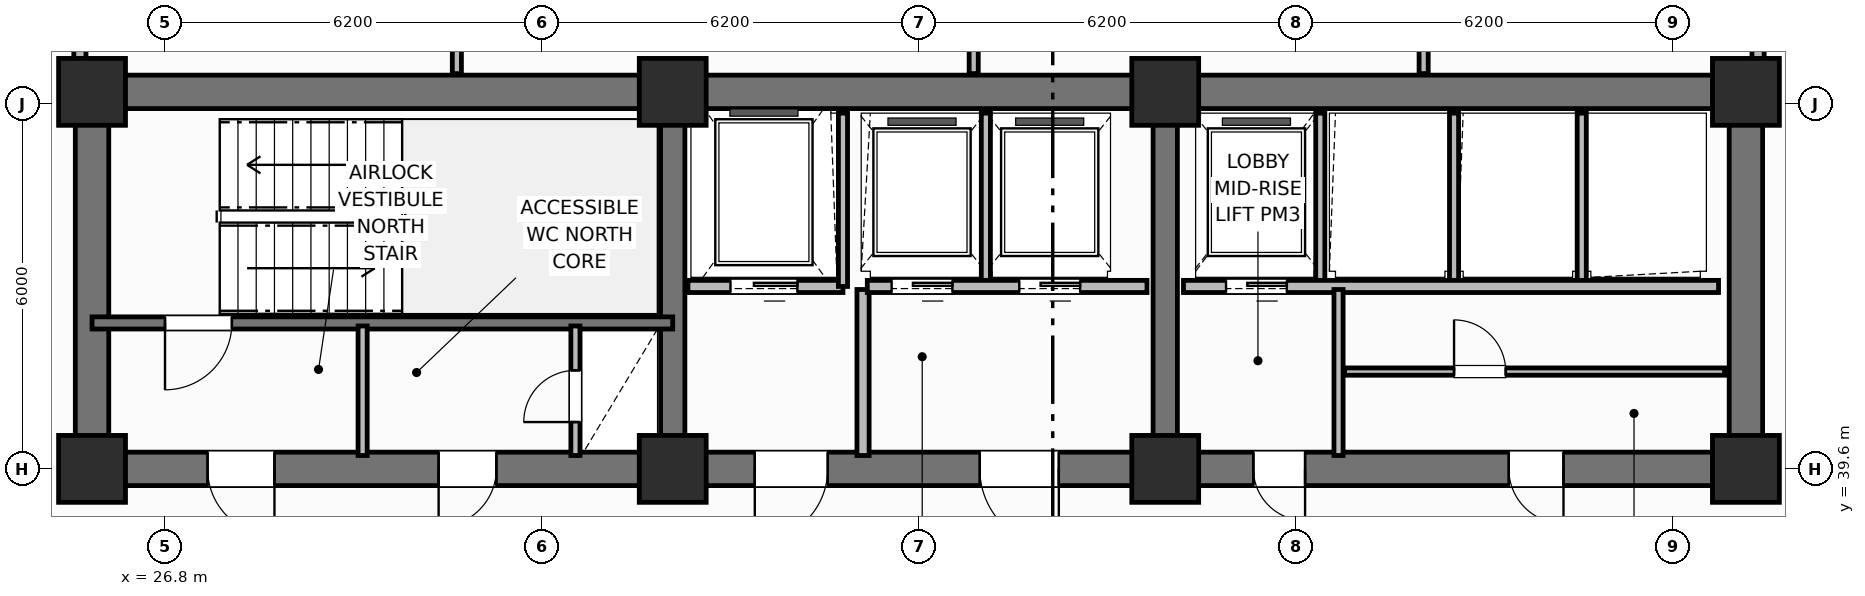
"""IFC4 building model, lengths in metres.
Left out: names, types, materials, properties, quantities, classifications, styles, units other than length and angle.
Written with IfcOpenShell. Run it as: python <this file> out.ifc"""

import sys

from ifc_helpers import new_model, si_unit, direction, frame, frame_2d, origin, origin_2d, place, context, subcontext, project, spatial, rectangle, extrude, element, fill, save


model = new_model("IFC4")
c1 = context("Model", 3, precision=1e-05, world=origin(), true_north=direction((0.0, 1.0)))
c2 = subcontext(c1, "Body", "Model", "MODEL_VIEW")
j1 = project(units=[si_unit("LENGTHUNIT", "METRE"), si_unit("PLANEANGLEUNIT", "RADIAN")], contexts=[c1])
p1 = place(None, origin())
s1 = spatial("IfcSite", under=j1, at=p1, CompositionType="ELEMENT")
p2 = place(p1, origin())
s2 = spatial("IfcBuilding", under=s1, at=p2, CompositionType="ELEMENT")
p3 = place(p2, frame((0.0, 0.0, 110.5)))
s3 = spatial("IfcBuildingStorey", under=s2, at=p3, CompositionType="ELEMENT", Elevation=110.5)
p4 = place(p3, frame((25.6, 45.8, 0.0), z_axis=(0.0, 0.0, 1.0), x_axis=(1.0, 0.0, 0.0)))
e1 = element("IfcWall", 1, at=p4, inside=s3, PredefinedType="SHEAR", context=c2, shape_type="SweptSolid", body=[
    extrude(rectangle(XDim=27.2, YDim=0.55, at=frame_2d((13.6, 0.0))), origin(), (0.0, 0.0, 1.0), 3.7),
])
for number, where, z_axis, x_axis in (
    (2, (25.6, 39.875, 0.0), (0.0, 0.0, 1.0), (0.0, 1.0, 0.0)),
    (3, (52.8, 39.875, 0.0), (0.0, 0.0, 1.0), (0.0, 1.0, 0.0)),
):
    element("IfcWall", number, at=place(p3, frame(where, z_axis=z_axis, x_axis=x_axis)), inside=s3, PredefinedType="SHEAR", context=c2, shape_type="SweptSolid", body=[
        extrude(rectangle(XDim=5.65, YDim=0.55, at=frame_2d((2.825, 0.0))), origin(), (0.0, 0.0, 1.0), 3.7),
    ])
p5 = place(p3, frame((52.8, 39.6, 0.0), z_axis=(0.0, 0.0, 1.0), x_axis=(-1.0, 0.0, 0.0)))
e4 = element("IfcWall", 4, at=p5, inside=s3, PredefinedType="SHEAR", context=c2, shape_type="SweptSolid", body=[
    extrude(rectangle(XDim=27.2, YDim=0.55, at=frame_2d((13.6, 0.0))), origin(), (0.0, 0.0, 1.0), 3.7),
])
p6 = place(p5, frame((24.2, 0.0, 0.0)))
e5 = element("IfcOpeningElement", 5, at=p6, cuts=e4, PredefinedType="OPENING", context=c2, shape_type="SweptSolid", body=[
    extrude(rectangle(XDim=1.1, YDim=2.15, at=frame_2d((0.55, 1.075))), frame((0.0, 0.285, 0.0), z_axis=(0.0, -1.0, 0.0), x_axis=(1.0, 0.0, 0.0)), (0.0, 0.0, 1.0), 0.57),
])
p7 = place(p5, frame((20.55, 0.0, 0.0)))
e6 = element("IfcOpeningElement", 6, at=p7, cuts=e4, PredefinedType="OPENING", context=c2, shape_type="SweptSolid", body=[
    extrude(rectangle(XDim=0.95, YDim=2.1, at=frame_2d((0.475, 1.05))), frame((0.0, 0.285, 0.0), z_axis=(0.0, -1.0, 0.0), x_axis=(1.0, 0.0, 0.0)), (0.0, 0.0, 1.0), 0.57),
])
p8 = place(p5, frame((15.1, 0.0, 0.0)))
e7 = element("IfcOpeningElement", 7, at=p8, cuts=e4, PredefinedType="OPENING", context=c2, shape_type="SweptSolid", body=[
    extrude(rectangle(XDim=1.2, YDim=2.15, at=frame_2d((0.6, 1.075))), frame((0.0, 0.285, 0.0), z_axis=(0.0, -1.0, 0.0), x_axis=(1.0, 0.0, 0.0)), (0.0, 0.0, 1.0), 0.57),
])
p9 = place(p5, frame((11.3, 0.0, 0.0)))
e8 = element("IfcOpeningElement", 8, at=p9, cuts=e4, PredefinedType="OPENING", context=c2, shape_type="SweptSolid", body=[
    extrude(rectangle(XDim=1.3, YDim=2.2, at=frame_2d((0.65, 1.1))), frame((0.0, 0.285, 0.0), z_axis=(0.0, -1.0, 0.0), x_axis=(1.0, 0.0, 0.0)), (0.0, 0.0, 1.0), 0.57),
])
p10 = place(p5, frame((7.25, 0.0, 0.0)))
e9 = element("IfcOpeningElement", 9, at=p10, cuts=e4, PredefinedType="OPENING", context=c2, shape_type="SweptSolid", body=[
    extrude(rectangle(XDim=0.85, YDim=2.1, at=frame_2d((0.425, 1.05))), frame((0.0, 0.285, 0.0), z_axis=(0.0, -1.0, 0.0), x_axis=(1.0, 0.0, 0.0)), (0.0, 0.0, 1.0), 0.57),
])
p11 = place(p5, frame((3.0, 0.0, 0.0)))
e10 = element("IfcOpeningElement", 10, at=p11, cuts=e4, PredefinedType="OPENING", context=c2, shape_type="SweptSolid", body=[
    extrude(rectangle(XDim=0.9, YDim=2.1, at=frame_2d((0.45, 1.05))), frame((0.0, 0.285, 0.0), z_axis=(0.0, -1.0, 0.0), x_axis=(1.0, 0.0, 0.0)), (0.0, 0.0, 1.0), 0.57),
])
for number, where, z_axis, x_axis in (
    (11, (35.15, 39.875, 0.0), (0.0, 0.0, 1.0), (0.0, 1.0, 0.0)),
    (12, (43.25, 39.875, 0.0), (0.0, 0.0, 1.0), (0.0, 1.0, 0.0)),
):
    element("IfcWall", number, at=place(p3, frame(where, z_axis=z_axis, x_axis=x_axis)), inside=s3, PredefinedType="SHEAR", context=c2, shape_type="SweptSolid", body=[
        extrude(rectangle(XDim=5.65, YDim=0.4, at=frame_2d((2.825, 0.0))), origin(), (0.0, 0.0, 1.0), 3.7),
    ])
for number, where, z_axis, x_axis in (
    (13, (25.6, 39.6, 0.0), (0.0, 0.0, 1.0), (1.0, 0.0, 0.0)),
    (14, (25.6, 45.8, 0.0), (0.0, 0.0, 1.0), (1.0, 0.0, 0.0)),
    (15, (35.15, 39.6, 0.0), (0.0, 0.0, 1.0), (1.0, 0.0, 0.0)),
    (16, (35.15, 45.8, 0.0), (0.0, 0.0, 1.0), (1.0, 0.0, 0.0)),
    (17, (43.25, 39.6, 0.0), (0.0, 0.0, 1.0), (1.0, 0.0, 0.0)),
    (18, (43.25, 45.8, 0.0), (0.0, 0.0, 1.0), (1.0, 0.0, 0.0)),
    (19, (52.8, 39.6, 0.0), (0.0, 0.0, 1.0), (1.0, 0.0, 0.0)),
    (20, (52.8, 45.8, 0.0), (0.0, 0.0, 1.0), (1.0, 0.0, 0.0)),
):
    element("IfcColumn", number, at=place(p3, frame(where, z_axis=z_axis, x_axis=x_axis)), inside=s3, PredefinedType="COLUMN", context=c2, shape_type="SweptSolid", body=[
        extrude(rectangle(XDim=1.1, YDim=1.1, at=origin_2d()), origin(), (0.0, 0.0, 1.0), 3.7),
    ])
p12 = place(p3, frame((35.15, 42.0, 0.0), z_axis=(0.0, 0.0, 1.0), x_axis=(-1.0, 0.0, 0.0)))
e21 = element("IfcWall", 21, at=p12, inside=s3, PredefinedType="SHEAR", context=c2, shape_type="SweptSolid", body=[
    extrude(rectangle(XDim=9.55, YDim=0.2, at=frame_2d((4.775, 0.0))), origin(), (0.0, 0.0, 1.0), 3.7),
])
p13 = place(p12, frame((7.25, 0.0, 0.0)))
e22 = element("IfcOpeningElement", 22, at=p13, cuts=e21, PredefinedType="OPENING", context=c2, shape_type="SweptSolid", body=[
    extrude(rectangle(XDim=1.1, YDim=2.15, at=frame_2d((0.55, 1.075))), frame((0.0, 0.11, 0.0), z_axis=(0.0, -1.0, 0.0), x_axis=(1.0, 0.0, 0.0)), (0.0, 0.0, 1.0), 0.22),
])
p14 = place(p3, frame((33.55, 39.82, 0.0), z_axis=(0.0, 0.0, 1.0), x_axis=(0.0, 1.0, 0.0)))
e23 = element("IfcWall", 23, at=p14, inside=s3, PredefinedType="PARTITIONING", context=c2, shape_type="SweptSolid", body=[
    extrude(rectangle(XDim=2.13, YDim=0.15, at=frame_2d((1.065, 0.0))), origin(), (0.0, 0.0, 1.0), 2.53),
])
p15 = place(p14, frame((0.55, 0.0, 0.0)))
e24 = element("IfcOpeningElement", 24, at=p15, cuts=e23, PredefinedType="OPENING", context=c2, shape_type="SweptSolid", body=[
    extrude(rectangle(XDim=0.85, YDim=2.05, at=frame_2d((0.425, 1.025))), frame((0.0, 0.085, 0.0), z_axis=(0.0, -1.0, 0.0), x_axis=(1.0, 0.0, 0.0)), (0.0, 0.0, 1.0), 0.17),
])
p16 = place(p3, frame((30.05, 39.82, 0.0), z_axis=(0.0, 0.0, 1.0), x_axis=(0.0, 1.0, 0.0)))
e25 = element("IfcWall", 25, at=p16, inside=s3, PredefinedType="PARTITIONING", context=c2, shape_type="SweptSolid", body=[
    extrude(rectangle(XDim=2.13, YDim=0.15, at=frame_2d((1.065, 0.0))), origin(), (0.0, 0.0, 1.0), 2.53),
])
p17 = place(p3, frame((37.95, 42.6, 0.0), z_axis=(0.0, 0.0, 1.0), x_axis=(-1.0, 0.0, 0.0)))
e26 = element("IfcWall", 26, at=p17, inside=s3, PredefinedType="PARTITIONING", context=c2, shape_type="SweptSolid", body=[
    extrude(rectangle(XDim=2.55, YDim=0.2, at=frame_2d((1.275, 0.0))), origin(), (0.0, 0.0, 1.0), 2.3),
])
p18 = place(p17, frame((0.75, 0.0, 0.0)))
e27 = element("IfcOpeningElement", 27, at=p18, cuts=e26, PredefinedType="OPENING", context=c2, shape_type="SweptSolid", body=[
    extrude(rectangle(XDim=1.1, YDim=2.15, at=frame_2d((0.55, 1.075))), frame((0.0, 0.11, 0.0), z_axis=(0.0, -1.0, 0.0), x_axis=(1.0, 0.0, 0.0)), (0.0, 0.0, 1.0), 0.22),
])
p19 = place(p3, frame((37.95, 42.6, 0.0), z_axis=(0.0, 0.0, 1.0), x_axis=(0.0, 1.0, 0.0)))
e28 = element("IfcWall", 28, at=p19, inside=s3, PredefinedType="PARTITIONING", context=c2, shape_type="SweptSolid", body=[
    extrude(rectangle(XDim=2.85, YDim=0.15, at=frame_2d((1.425, 0.0))), origin(), (0.0, 0.0, 1.0), 2.53),
])
p20 = place(p3, frame((38.28, 39.82, 0.0), z_axis=(0.0, 0.0, 1.0), x_axis=(0.0, 1.0, 0.0)))
e29 = element("IfcWall", 29, at=p20, inside=s3, PredefinedType="PARTITIONING", context=c2, shape_type="SweptSolid", body=[
    extrude(rectangle(XDim=2.73, YDim=0.2, at=frame_2d((1.365, 0.0))), origin(), (0.0, 0.0, 1.0), 2.53),
])
p21 = place(p3, frame((40.3, 42.65, 0.0), z_axis=(0.0, 0.0, 1.0), x_axis=(0.0, 1.0, 0.0)))
e30 = element("IfcWall", 30, at=p21, inside=s3, PredefinedType="PARTITIONING", context=c2, shape_type="SweptSolid", body=[
    extrude(rectangle(XDim=2.8, YDim=0.15, at=frame_2d((1.4, 0.0))), origin(), (0.0, 0.0, 1.0), 2.53),
])
p22 = place(p3, frame((42.95, 42.6, 0.0), z_axis=(0.0, 0.0, 1.0), x_axis=(-1.0, 0.0, 0.0)))
e31 = element("IfcWall", 31, at=p22, inside=s3, PredefinedType="PARTITIONING", context=c2, shape_type="SweptSolid", body=[
    extrude(rectangle(XDim=4.6, YDim=0.2, at=frame_2d((2.3, 0.0))), origin(), (0.0, 0.0, 1.0), 2.3),
])
p23 = place(p22, frame((3.2, 0.0, 0.0)))
e32 = element("IfcOpeningElement", 32, at=p23, cuts=e31, PredefinedType="OPENING", context=c2, shape_type="SweptSolid", body=[
    extrude(rectangle(XDim=1.0, YDim=2.15, at=frame_2d((0.5, 1.075))), frame((0.0, 0.11, 0.0), z_axis=(0.0, -1.0, 0.0), x_axis=(1.0, 0.0, 0.0)), (0.0, 0.0, 1.0), 0.22),
])
p24 = place(p22, frame((1.1, 0.0, 0.0)))
e33 = element("IfcOpeningElement", 33, at=p24, cuts=e31, PredefinedType="OPENING", context=c2, shape_type="SweptSolid", body=[
    extrude(rectangle(XDim=1.0, YDim=2.15, at=frame_2d((0.5, 1.075))), frame((0.0, 0.11, 0.0), z_axis=(0.0, -1.0, 0.0), x_axis=(1.0, 0.0, 0.0)), (0.0, 0.0, 1.0), 0.22),
])
for number, where, z_axis, x_axis in (
    (34, (45.8, 42.65, 0.0), (0.0, 0.0, 1.0), (0.0, 1.0, 0.0)),
    (35, (48.0, 42.65, 0.0), (0.0, 0.0, 1.0), (0.0, 1.0, 0.0)),
    (36, (50.1, 42.65, 0.0), (0.0, 0.0, 1.0), (0.0, 1.0, 0.0)),
):
    element("IfcWall", number, at=place(p3, frame(where, z_axis=z_axis, x_axis=x_axis)), inside=s3, PredefinedType="PARTITIONING", context=c2, shape_type="SweptSolid", body=[
        extrude(rectangle(XDim=2.8, YDim=0.15, at=frame_2d((1.4, 0.0))), origin(), (0.0, 0.0, 1.0), 2.53),
    ])
p25 = place(p3, frame((52.35, 42.6, 0.0), z_axis=(0.0, 0.0, 1.0), x_axis=(-1.0, 0.0, 0.0)))
e37 = element("IfcWall", 37, at=p25, inside=s3, PredefinedType="PARTITIONING", context=c2, shape_type="SweptSolid", body=[
    extrude(rectangle(XDim=8.8, YDim=0.2, at=frame_2d((4.4, 0.0))), origin(), (0.0, 0.0, 1.0), 2.53),
])
p26 = place(p25, frame((7.1, 0.0, 0.0)))
e38 = element("IfcOpeningElement", 38, at=p26, cuts=e37, PredefinedType="OPENING", context=c2, shape_type="SweptSolid", body=[
    extrude(rectangle(XDim=1.0, YDim=2.15, at=frame_2d((0.5, 1.075))), frame((0.0, 0.11, 0.0), z_axis=(0.0, -1.0, 0.0), x_axis=(1.0, 0.0, 0.0)), (0.0, 0.0, 1.0), 0.22),
])
p27 = place(p3, frame((46.1, 39.82, 0.0), z_axis=(0.0, 0.0, 1.0), x_axis=(0.0, 1.0, 0.0)))
e39 = element("IfcWall", 39, at=p27, inside=s3, PredefinedType="PARTITIONING", context=c2, shape_type="SweptSolid", body=[
    extrude(rectangle(XDim=2.73, YDim=0.15, at=frame_2d((1.365, 0.0))), origin(), (0.0, 0.0, 1.0), 2.53),
])
p28 = place(p3, frame((46.2, 41.2, 0.0), z_axis=(0.0, 0.0, 1.0), x_axis=(1.0, 0.0, 0.0)))
e40 = element("IfcWall", 40, at=p28, inside=s3, PredefinedType="PARTITIONING", context=c2, shape_type="SweptSolid", body=[
    extrude(rectangle(XDim=6.25, YDim=0.12, at=frame_2d((3.125, 0.0))), origin(), (0.0, 0.0, 1.0), 2.53),
])
p29 = place(p28, frame((1.8, 0.0, 0.0)))
e41 = element("IfcOpeningElement", 41, at=p29, cuts=e40, PredefinedType="OPENING", context=c2, shape_type="SweptSolid", body=[
    extrude(rectangle(XDim=0.85, YDim=2.1, at=frame_2d((0.425, 1.05))), frame((0.0, 0.07, 0.0), z_axis=(0.0, -1.0, 0.0), x_axis=(1.0, 0.0, 0.0)), (0.0, 0.0, 1.0), 0.14),
])
p30 = place(p3, frame((31.6, 46.1, 0.0), z_axis=(0.0, 0.0, 1.0), x_axis=(0.0, 1.0, 0.0)))
e42 = element("IfcWall", 42, at=p30, inside=s3, PredefinedType="PARTITIONING", context=c2, shape_type="SweptSolid", body=[
    extrude(rectangle(XDim=5.33, YDim=0.15, at=frame_2d((2.665, 0.0))), origin(), (0.0, 0.0, 1.0), 2.53),
])
p31 = place(p30, frame((0.85, 0.0, 0.0)))
e43 = element("IfcOpeningElement", 43, at=p31, cuts=e42, PredefinedType="OPENING", context=c2, shape_type="SweptSolid", body=[
    extrude(rectangle(XDim=0.9, YDim=2.1, at=frame_2d((0.45, 1.05))), frame((0.0, 0.085, 0.0), z_axis=(0.0, -1.0, 0.0), x_axis=(1.0, 0.0, 0.0)), (0.0, 0.0, 1.0), 0.17),
])
p32 = place(p3, frame((40.1, 46.1, 0.0), z_axis=(0.0, 0.0, 1.0), x_axis=(0.0, 1.0, 0.0)))
e44 = element("IfcWall", 44, at=p32, inside=s3, PredefinedType="PARTITIONING", context=c2, shape_type="SweptSolid", body=[
    extrude(rectangle(XDim=5.33, YDim=0.15, at=frame_2d((2.665, 0.0))), origin(), (0.0, 0.0, 1.0), 2.53),
])
p33 = place(p3, frame((47.5, 46.1, 0.0), z_axis=(0.0, 0.0, 1.0), x_axis=(0.0, 1.0, 0.0)))
e45 = element("IfcWall", 45, at=p33, inside=s3, PredefinedType="PARTITIONING", context=c2, shape_type="SweptSolid", body=[
    extrude(rectangle(XDim=5.33, YDim=0.15, at=frame_2d((2.665, 0.0))), origin(), (0.0, 0.0, 1.0), 2.53),
])
p34 = place(p33, frame((0.85, 0.0, 0.0)))
e46 = element("IfcOpeningElement", 46, at=p34, cuts=e45, PredefinedType="OPENING", context=c2, shape_type="SweptSolid", body=[
    extrude(rectangle(XDim=0.9, YDim=2.1, at=frame_2d((0.45, 1.05))), frame((0.0, 0.085, 0.0), z_axis=(0.0, -1.0, 0.0), x_axis=(1.0, 0.0, 0.0)), (0.0, 0.0, 1.0), 0.17),
])
p35 = place(p3, frame((25.4, 46.1, 0.0), z_axis=(0.0, 0.0, 1.0), x_axis=(0.0, 1.0, 0.0)))
e47 = element("IfcWall", 47, at=p35, inside=s3, PredefinedType="PARTITIONING", context=c2, shape_type="SweptSolid", body=[
    extrude(rectangle(XDim=3.98, YDim=0.2, at=frame_2d((1.99, 0.0))), origin(), (0.0, 0.0, 1.0), 2.53),
])
p36 = place(p35, frame((1.05, 0.0, 0.0)))
e48 = element("IfcOpeningElement", 48, at=p36, cuts=e47, PredefinedType="OPENING", context=c2, shape_type="SweptSolid", body=[
    extrude(rectangle(XDim=0.9, YDim=2.1, at=frame_2d((0.45, 1.05))), frame((0.0, 0.11, 0.0), z_axis=(0.0, -1.0, 0.0), x_axis=(1.0, 0.0, 0.0)), (0.0, 0.0, 1.0), 0.22),
])
p37 = place(p3, frame((53.0, 46.1, 0.0), z_axis=(0.0, 0.0, 1.0), x_axis=(0.0, 1.0, 0.0)))
e49 = element("IfcWall", 49, at=p37, inside=s3, PredefinedType="PARTITIONING", context=c2, shape_type="SweptSolid", body=[
    extrude(rectangle(XDim=3.98, YDim=0.2, at=frame_2d((1.99, 0.0))), origin(), (0.0, 0.0, 1.0), 2.53),
])
p38 = place(p37, frame((1.05, 0.0, 0.0)))
e50 = element("IfcOpeningElement", 50, at=p38, cuts=e49, PredefinedType="OPENING", context=c2, shape_type="SweptSolid", body=[
    extrude(rectangle(XDim=0.9, YDim=2.1, at=frame_2d((0.45, 1.05))), frame((0.0, 0.11, 0.0), z_axis=(0.0, -1.0, 0.0), x_axis=(1.0, 0.0, 0.0)), (0.0, 0.0, 1.0), 0.22),
])
p39 = place(p13, origin())
e51 = element("IfcDoor", 51, at=p39, inside=s3, OperationType="SINGLE_SWING_RIGHT", PredefinedType="DOOR", context=c2, shape_type="SweptSolid", body=[
    extrude(rectangle(XDim=1.1, YDim=2.15, at=frame_2d((0.55, 1.075))), frame((0.0, 0.025, 0.0), z_axis=(0.0, -1.0, 0.0), x_axis=(1.0, 0.0, 0.0)), (0.0, 0.0, 1.0), 0.05),
])
fill(e22, e51)
p40 = place(p15, origin())
e52 = element("IfcDoor", 52, at=p40, inside=s3, OperationType="SINGLE_SWING_LEFT", PredefinedType="TRAPDOOR", context=c2, shape_type="SweptSolid", body=[
    extrude(rectangle(XDim=0.85, YDim=2.05, at=frame_2d((0.425, 1.025))), frame((0.0, 0.025, 0.0), z_axis=(0.0, -1.0, 0.0), x_axis=(1.0, 0.0, 0.0)), (0.0, 0.0, 1.0), 0.05),
])
fill(e24, e52)
p41 = place(p18, origin())
e53 = element("IfcDoor", 53, at=p41, inside=s3, OperationType="SLIDING_TO_LEFT", PredefinedType="DOOR", context=c2, shape_type="SweptSolid", body=[
    extrude(rectangle(XDim=1.1, YDim=2.15, at=frame_2d((0.55, 1.075))), frame((0.0, 0.025, 0.0), z_axis=(0.0, -1.0, 0.0), x_axis=(1.0, 0.0, 0.0)), (0.0, 0.0, 1.0), 0.05),
])
fill(e27, e53)
p42 = place(p23, origin())
e54 = element("IfcDoor", 54, at=p42, inside=s3, OperationType="SLIDING_TO_LEFT", PredefinedType="DOOR", context=c2, shape_type="SweptSolid", body=[
    extrude(rectangle(XDim=1.0, YDim=2.15, at=frame_2d((0.5, 1.075))), frame((0.0, 0.025, 0.0), z_axis=(0.0, -1.0, 0.0), x_axis=(1.0, 0.0, 0.0)), (0.0, 0.0, 1.0), 0.05),
])
fill(e32, e54)
p43 = place(p24, origin())
e55 = element("IfcDoor", 55, at=p43, inside=s3, OperationType="SLIDING_TO_LEFT", PredefinedType="DOOR", context=c2, shape_type="SweptSolid", body=[
    extrude(rectangle(XDim=1.0, YDim=2.15, at=frame_2d((0.5, 1.075))), frame((0.0, 0.025, 0.0), z_axis=(0.0, -1.0, 0.0), x_axis=(1.0, 0.0, 0.0)), (0.0, 0.0, 1.0), 0.05),
])
fill(e33, e55)
p44 = place(p26, origin())
e56 = element("IfcDoor", 56, at=p44, inside=s3, OperationType="SLIDING_TO_LEFT", PredefinedType="DOOR", context=c2, shape_type="SweptSolid", body=[
    extrude(rectangle(XDim=1.0, YDim=2.15, at=frame_2d((0.5, 1.075))), frame((0.0, 0.025, 0.0), z_axis=(0.0, -1.0, 0.0), x_axis=(1.0, 0.0, 0.0)), (0.0, 0.0, 1.0), 0.05),
])
fill(e38, e56)
p45 = place(p29, origin())
e57 = element("IfcDoor", 57, at=p45, inside=s3, OperationType="SINGLE_SWING_LEFT", PredefinedType="DOOR", context=c2, shape_type="SweptSolid", body=[
    extrude(rectangle(XDim=0.85, YDim=2.1, at=frame_2d((0.425, 1.05))), frame((0.0, 0.025, 0.0), z_axis=(0.0, -1.0, 0.0), x_axis=(1.0, 0.0, 0.0)), (0.0, 0.0, 1.0), 0.05),
])
fill(e41, e57)
p46 = place(p6, origin())
e58 = element("IfcDoor", 58, at=p46, inside=s3, OperationType="SINGLE_SWING_LEFT", PredefinedType="DOOR", context=c2, shape_type="SweptSolid", body=[
    extrude(rectangle(XDim=1.1, YDim=2.15, at=frame_2d((0.55, 1.075))), frame((0.0, 0.025, 0.0), z_axis=(0.0, -1.0, 0.0), x_axis=(1.0, 0.0, 0.0)), (0.0, 0.0, 1.0), 0.05),
])
fill(e5, e58)
p47 = place(p7, origin())
e59 = element("IfcDoor", 59, at=p47, inside=s3, OperationType="SINGLE_SWING_RIGHT", PredefinedType="DOOR", context=c2, shape_type="SweptSolid", body=[
    extrude(rectangle(XDim=0.95, YDim=2.1, at=frame_2d((0.475, 1.05))), frame((0.0, 0.025, 0.0), z_axis=(0.0, -1.0, 0.0), x_axis=(1.0, 0.0, 0.0)), (0.0, 0.0, 1.0), 0.05),
])
fill(e6, e59)
p48 = place(p8, origin())
e60 = element("IfcDoor", 60, at=p48, inside=s3, OperationType="SINGLE_SWING_RIGHT", PredefinedType="DOOR", context=c2, shape_type="SweptSolid", body=[
    extrude(rectangle(XDim=1.2, YDim=2.15, at=frame_2d((0.6, 1.075))), frame((0.0, 0.025, 0.0), z_axis=(0.0, -1.0, 0.0), x_axis=(1.0, 0.0, 0.0)), (0.0, 0.0, 1.0), 0.05),
])
fill(e7, e60)
p49 = place(p9, origin())
e61 = element("IfcDoor", 61, at=p49, inside=s3, OperationType="SINGLE_SWING_LEFT", PredefinedType="DOOR", context=c2, shape_type="SweptSolid", body=[
    extrude(rectangle(XDim=1.3, YDim=2.2, at=frame_2d((0.65, 1.1))), frame((0.0, 0.025, 0.0), z_axis=(0.0, -1.0, 0.0), x_axis=(1.0, 0.0, 0.0)), (0.0, 0.0, 1.0), 0.05),
])
fill(e8, e61)
p50 = place(p10, origin())
e62 = element("IfcDoor", 62, at=p50, inside=s3, OperationType="SINGLE_SWING_LEFT", PredefinedType="DOOR", context=c2, shape_type="SweptSolid", body=[
    extrude(rectangle(XDim=0.85, YDim=2.1, at=frame_2d((0.425, 1.05))), frame((0.0, 0.025, 0.0), z_axis=(0.0, -1.0, 0.0), x_axis=(1.0, 0.0, 0.0)), (0.0, 0.0, 1.0), 0.05),
])
fill(e9, e62)
p51 = place(p11, origin())
e63 = element("IfcDoor", 63, at=p51, inside=s3, OperationType="SINGLE_SWING_LEFT", PredefinedType="DOOR", context=c2, shape_type="SweptSolid", body=[
    extrude(rectangle(XDim=0.9, YDim=2.1, at=frame_2d((0.45, 1.05))), frame((0.0, 0.025, 0.0), z_axis=(0.0, -1.0, 0.0), x_axis=(1.0, 0.0, 0.0)), (0.0, 0.0, 1.0), 0.05),
])
fill(e10, e63)
save(model, sys.argv[1])
